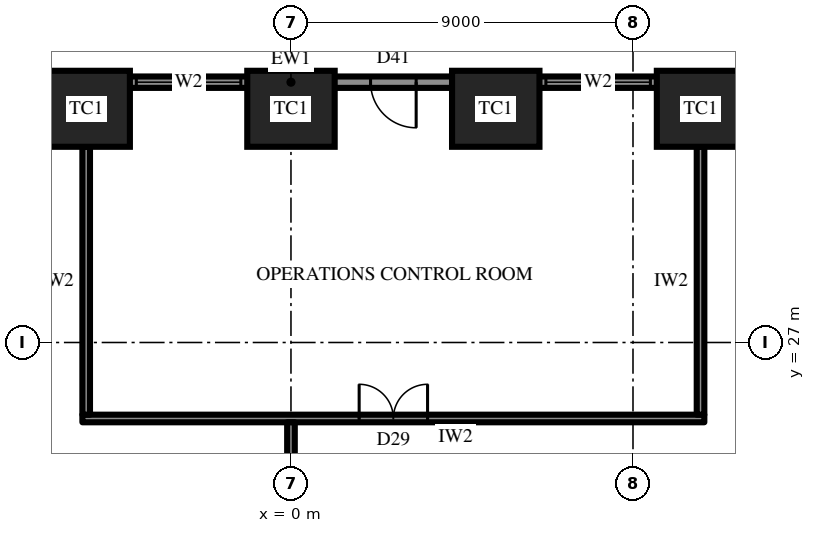
"""IFC4 building model, lengths in metres.
Left out: names, types, materials, properties, quantities, classifications, styles, units other than length and angle.
Written with IfcOpenShell. Run it as: python <this file> out.ifc"""

import sys

from ifc_helpers import new_model, si_unit, direction, frame, frame_2d, origin, origin_2d, place, context, subcontext, project, spatial, rectangle, extrude, element, fill, save


model = new_model("IFC4")
c1 = context("Model", 3, precision=1e-05, world=origin(), true_north=direction((0.0, 1.0)))
c2 = subcontext(c1, "Body", "Model", "MODEL_VIEW")
j1 = project(units=[si_unit("LENGTHUNIT", "METRE"), si_unit("PLANEANGLEUNIT", "RADIAN")], contexts=[c1])
p1 = place(None, origin())
s1 = spatial("IfcSite", under=j1, at=p1, CompositionType="ELEMENT")
p2 = place(p1, origin())
s2 = spatial("IfcBuilding", under=s1, at=p2, CompositionType="ELEMENT")
p3 = place(p2, frame((0.0, 0.0, 36.1)))
s3 = spatial("IfcBuildingStorey", under=s2, at=p3, CompositionType="ELEMENT", Elevation=36.1)
for number, where, z_axis, x_axis in (
    (1, (10.777, 33.15, 0.0), (0.0, 0.0, 1.0), (-1.0, 0.0, 0.0)),
    (2, (5.389, 33.15, 0.0), (0.0, 0.0, 1.0), (-1.0, 0.0, 0.0)),
    (3, (0.0, 33.15, 0.0), (0.0, 0.0, 1.0), (-1.0, 0.0, 0.0)),
    (4, (-5.389, 33.15, 0.0), (0.0, 0.0, 1.0), (-1.0, 0.0, 0.0)),
):
    element("IfcColumn", number, at=place(p3, frame(where, z_axis=z_axis, x_axis=x_axis)), inside=s3, PredefinedType="COLUMN", context=c2, shape_type="SweptSolid", body=[
        extrude(rectangle(XDim=2.3, YDim=2.0, at=origin_2d()), origin(), (0.0, 0.0, 1.0), 4.2),
    ])
p4 = place(p3, frame((16.166, 33.85, 0.0), z_axis=(0.0, 0.0, 1.0), x_axis=(-1.0, 0.0, 0.0)))
e5 = element("IfcWall", 5, at=p4, inside=s3, PredefinedType="SOLIDWALL", context=c2, shape_type="SweptSolid", body=[
    extrude(rectangle(XDim=32.332, YDim=0.3, at=frame_2d((16.166, 0.0))), origin(), (0.0, 0.0, 1.0), 2.7),
])
p5 = place(p4, frame((1.319, 0.0, 0.6)))
e6 = element("IfcOpeningElement", 6, at=p5, cuts=e5, PredefinedType="OPENING", context=c2, shape_type="SweptSolid", body=[
    extrude(rectangle(XDim=2.75, YDim=1.85, at=frame_2d((1.375, 0.925))), frame((0.0, 0.16, 0.0), z_axis=(0.0, -1.0, 0.0), x_axis=(1.0, 0.0, 0.0)), (0.0, 0.0, 1.0), 0.32),
])
p6 = place(p4, frame((6.708, 0.0, 0.6)))
e7 = element("IfcOpeningElement", 7, at=p6, cuts=e5, PredefinedType="OPENING", context=c2, shape_type="SweptSolid", body=[
    extrude(rectangle(XDim=2.75, YDim=1.85, at=frame_2d((1.375, 0.925))), frame((0.0, 0.16, 0.0), z_axis=(0.0, -1.0, 0.0), x_axis=(1.0, 0.0, 0.0)), (0.0, 0.0, 1.0), 0.32),
])
p7 = place(p4, frame((12.872, 0.0, 0.0)))
e8 = element("IfcOpeningElement", 8, at=p7, cuts=e5, PredefinedType="OPENING", context=c2, shape_type="SweptSolid", body=[
    extrude(rectangle(XDim=1.2, YDim=2.4, at=frame_2d((0.6, 1.2))), frame((0.0, 0.16, 0.0), z_axis=(0.0, -1.0, 0.0), x_axis=(1.0, 0.0, 0.0)), (0.0, 0.0, 1.0), 0.32),
])
p8 = place(p4, frame((17.485, 0.0, 0.6)))
e9 = element("IfcOpeningElement", 9, at=p8, cuts=e5, PredefinedType="OPENING", context=c2, shape_type="SweptSolid", body=[
    extrude(rectangle(XDim=2.75, YDim=1.85, at=frame_2d((1.375, 0.925))), frame((0.0, 0.16, 0.0), z_axis=(0.0, -1.0, 0.0), x_axis=(1.0, 0.0, 0.0)), (0.0, 0.0, 1.0), 0.32),
])
p9 = place(p4, frame((22.874, 0.0, 0.6)))
e10 = element("IfcOpeningElement", 10, at=p9, cuts=e5, PredefinedType="OPENING", context=c2, shape_type="SweptSolid", body=[
    extrude(rectangle(XDim=2.75, YDim=1.85, at=frame_2d((1.375, 0.925))), frame((0.0, 0.16, 0.0), z_axis=(0.0, -1.0, 0.0), x_axis=(1.0, 0.0, 0.0)), (0.0, 0.0, 1.0), 0.32),
])
p10 = place(p4, frame((28.262, 0.0, 0.6)))
e11 = element("IfcOpeningElement", 11, at=p10, cuts=e5, PredefinedType="OPENING", context=c2, shape_type="SweptSolid", body=[
    extrude(rectangle(XDim=2.75, YDim=1.85, at=frame_2d((1.375, 0.925))), frame((0.0, 0.16, 0.0), z_axis=(0.0, -1.0, 0.0), x_axis=(1.0, 0.0, 0.0)), (0.0, 0.0, 1.0), 0.32),
])
p11 = place(p3, frame((10.877, 25.0, 0.0), z_axis=(0.0, 0.0, 1.0), x_axis=(-1.0, 0.0, 0.0)))
e12 = element("IfcWall", 12, at=p11, inside=s3, PredefinedType="PARTITIONING", context=c2, shape_type="SweptSolid", body=[
    extrude(rectangle(XDim=16.366, YDim=0.2, at=frame_2d((8.183, 0.0))), origin(), (0.0, 0.0, 1.0), 4.0),
])
p12 = place(p11, frame((7.283, 0.0, 0.0)))
e13 = element("IfcOpeningElement", 13, at=p12, cuts=e12, PredefinedType="OPENING", context=c2, shape_type="SweptSolid", body=[
    extrude(rectangle(XDim=1.8, YDim=2.4, at=frame_2d((0.9, 1.2))), frame((0.0, 0.11, 0.0), z_axis=(0.0, -1.0, 0.0), x_axis=(1.0, 0.0, 0.0)), (0.0, 0.0, 1.0), 0.22),
])
for number, where, z_axis, x_axis in (
    (14, (10.777, 25.1, 0.0), (0.0, 0.0, 1.0), (0.0, 1.0, 0.0)),
    (15, (-5.389, 25.1, 0.0), (0.0, 0.0, 1.0), (0.0, 1.0, 0.0)),
):
    element("IfcWall", number, at=place(p3, frame(where, z_axis=z_axis, x_axis=x_axis)), inside=s3, PredefinedType="PARTITIONING", context=c2, shape_type="SweptSolid", body=[
        extrude(rectangle(XDim=7.05, YDim=0.2, at=frame_2d((3.525, 0.0))), origin(), (0.0, 0.0, 1.0), 2.944),
    ])
p13 = place(p3, frame((0.0, 18.2, 0.0), z_axis=(0.0, 0.0, 1.0), x_axis=(0.0, 1.0, 0.0)))
e16 = element("IfcWall", 16, at=p13, inside=s3, PredefinedType="PARTITIONING", context=c2, shape_type="SweptSolid", body=[
    extrude(rectangle(XDim=6.7, YDim=0.2, at=frame_2d((3.35, 0.0))), origin(), (0.0, 0.0, 1.0), 2.944),
])
p14 = place(p13, frame((0.2, 0.0, 0.0)))
e17 = element("IfcOpeningElement", 17, at=p14, cuts=e16, PredefinedType="OPENING", context=c2, shape_type="SweptSolid", body=[
    extrude(rectangle(XDim=1.0, YDim=2.2, at=frame_2d((0.5, 1.1))), frame((0.0, 0.11, 0.0), z_axis=(0.0, -1.0, 0.0), x_axis=(1.0, 0.0, 0.0)), (0.0, 0.0, 1.0), 0.22),
])
p15 = place(p6, origin())
e18 = element("IfcWindow", 18, at=p15, inside=s3, PartitioningType="SINGLE_PANEL", PredefinedType="WINDOW", context=c2, shape_type="SweptSolid", body=[
    extrude(rectangle(XDim=2.75, YDim=1.85, at=frame_2d((1.375, 0.925))), frame((0.0, 0.03, 0.0), z_axis=(0.0, -1.0, 0.0), x_axis=(1.0, 0.0, 0.0)), (0.0, 0.0, 1.0), 0.06),
])
fill(e7, e18)
p16 = place(p7, origin())
e19 = element("IfcDoor", 19, at=p16, inside=s3, OperationType="SINGLE_SWING_RIGHT", PredefinedType="DOOR", context=c2, shape_type="SweptSolid", body=[
    extrude(rectangle(XDim=1.2, YDim=2.4, at=frame_2d((0.6, 1.2))), frame((0.0, 0.025, 0.0), z_axis=(0.0, -1.0, 0.0), x_axis=(1.0, 0.0, 0.0)), (0.0, 0.0, 1.0), 0.05),
])
fill(e8, e19)
p17 = place(p8, origin())
e20 = element("IfcWindow", 20, at=p17, inside=s3, PartitioningType="SINGLE_PANEL", PredefinedType="WINDOW", context=c2, shape_type="SweptSolid", body=[
    extrude(rectangle(XDim=2.75, YDim=1.85, at=frame_2d((1.375, 0.925))), frame((0.0, 0.03, 0.0), z_axis=(0.0, -1.0, 0.0), x_axis=(1.0, 0.0, 0.0)), (0.0, 0.0, 1.0), 0.06),
])
fill(e9, e20)
p18 = place(p12, frame((1.8, 0.0, 0.0), z_axis=(0.0, 0.0, 1.0), x_axis=(-1.0, 0.0, 0.0)))
e21 = element("IfcDoor", 21, at=p18, inside=s3, OperationType="DOUBLE_DOOR_SINGLE_SWING", PredefinedType="DOOR", context=c2, shape_type="SweptSolid", body=[
    extrude(rectangle(XDim=1.8, YDim=2.4, at=frame_2d((0.9, 1.2))), frame((0.0, 0.025, 0.0), z_axis=(0.0, -1.0, 0.0), x_axis=(1.0, 0.0, 0.0)), (0.0, 0.0, 1.0), 0.05),
])
fill(e13, e21)
save(model, sys.argv[1])
